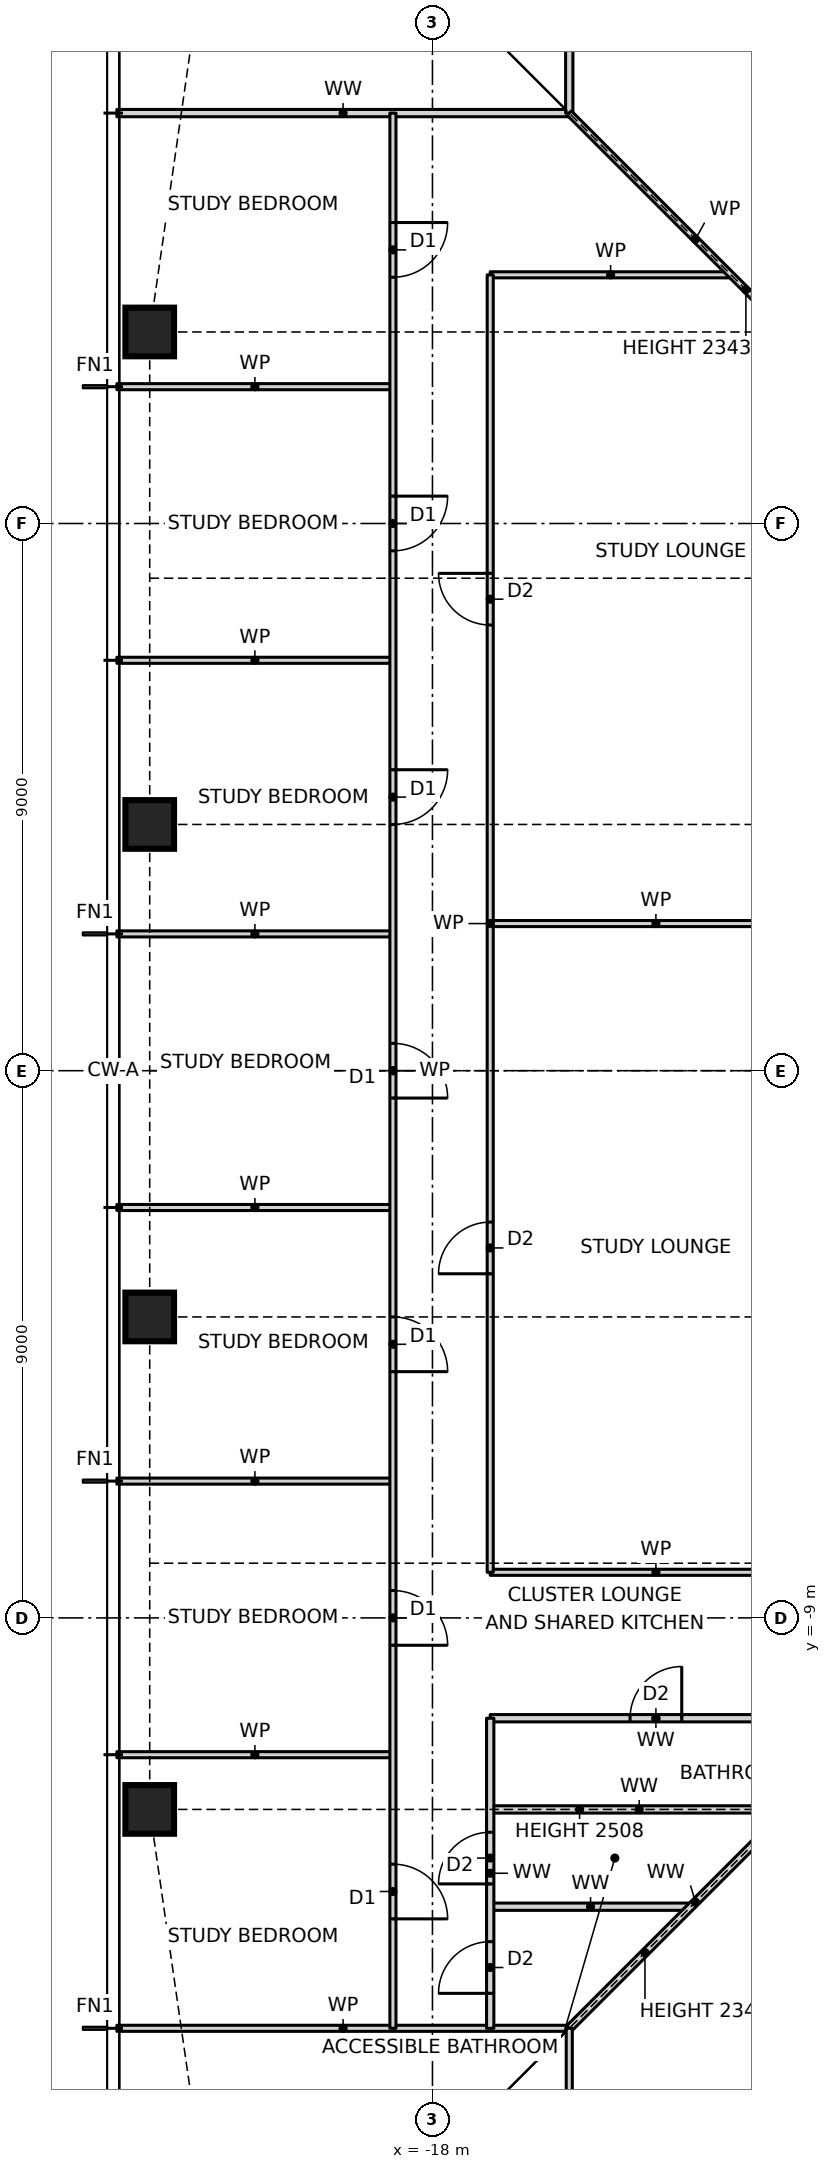
"""IFC4 building model, lengths in metres.
Left out: names, types, materials, properties, quantities, classifications, styles, units other than length and angle.
Written with IfcOpenShell. Run it as: python <this file> out.ifc"""

import sys

from ifc_helpers import new_model, si_unit, direction, frame, frame_2d, origin, origin_2d, place, context, subcontext, project, spatial, rectangle, hollow_rectangle, extrude, element, fill, save


model = new_model("IFC4")
c1 = context("Model", 3, precision=1e-05, world=origin(), true_north=direction((0.0, 1.0)))
c2 = subcontext(c1, "Body", "Model", "MODEL_VIEW")
j1 = project(units=[si_unit("LENGTHUNIT", "METRE"), si_unit("PLANEANGLEUNIT", "RADIAN")], contexts=[c1])
p1 = place(None, origin())
s1 = spatial("IfcSite", under=j1, at=p1, CompositionType="ELEMENT")
p2 = place(p1, origin())
s2 = spatial("IfcBuilding", under=s1, at=p2, CompositionType="ELEMENT")
p3 = place(p2, frame((0.0, 0.0, 25.5)))
s3 = spatial("IfcBuildingStorey", under=s2, at=p3, CompositionType="ELEMENT", Elevation=25.5)
for number, where, z_axis, x_axis in (
    (1, (-22.65, 12.15, 0.0), (0.0, 0.0, 1.0), (1.0, 0.0, 0.0)),
    (2, (-22.65, 4.05, 0.0), (0.0, 0.0, 1.0), (1.0, 0.0, 0.0)),
    (3, (-22.65, -4.05, 0.0), (0.0, 0.0, 1.0), (1.0, 0.0, 0.0)),
    (4, (-22.65, -12.15, 0.0), (0.0, 0.0, 1.0), (1.0, 0.0, 0.0)),
):
    element("IfcColumn", number, at=place(p3, frame(where, z_axis=z_axis, x_axis=x_axis)), inside=s3, PredefinedType="COLUMN", context=c2, shape_type="SweptSolid", body=[
        extrude(hollow_rectangle(XDim=0.8, YDim=0.8, WallThickness=0.09, at=origin_2d()), origin(), (0.0, 0.0, 1.0), 3.5),
    ])
p4 = place(p3, frame((-23.19, -15.75, 0.0), z_axis=(0.0, 0.0, 1.0), x_axis=(1.0, 0.0, 0.0)))
e5 = element("IfcWall", 5, at=p4, inside=s3, PredefinedType="PARTITIONING", context=c2, shape_type="SweptSolid", body=[
    extrude(rectangle(XDim=7.44, YDim=0.1, at=frame_2d((3.72, 0.0))), origin(), (0.0, 0.0, 1.0), 3.27),
])
p5 = place(p3, frame((-17.05, -13.75, 0.0), z_axis=(0.0, 0.0, 1.0), x_axis=(1.0, 0.0, 0.0)))
e6 = element("IfcWall", 6, at=p5, inside=s3, PredefinedType="PARTITIONING", context=c2, shape_type="SweptSolid", body=[
    extrude(rectangle(XDim=3.3, YDim=0.12, at=frame_2d((1.65, 0.0))), origin(), (0.0, 0.0, 1.0), 3.27),
])
p6 = place(p3, frame((-17.05, -12.15, 0.0), z_axis=(0.0, 0.0, 1.0), x_axis=(1.0, 0.0, 0.0)))
e7 = element("IfcWall", 7, at=p6, inside=s3, PredefinedType="PARTITIONING", context=c2, shape_type="SweptSolid", body=[
    extrude(rectangle(XDim=4.9, YDim=0.12, at=frame_2d((2.45, 0.0))), origin(), (0.0, 0.0, 1.0), 2.508),
])
p7 = place(p3, frame((-23.19, -11.25, 0.0), z_axis=(0.0, 0.0, 1.0), x_axis=(1.0, 0.0, 0.0)))
e8 = element("IfcWall", 8, at=p7, inside=s3, PredefinedType="PARTITIONING", context=c2, shape_type="SweptSolid", body=[
    extrude(rectangle(XDim=4.54, YDim=0.1, at=frame_2d((2.27, 0.0))), origin(), (0.0, 0.0, 1.0), 3.27),
])
p8 = place(p3, frame((-17.05, -10.65, 0.0), z_axis=(0.0, 0.0, 1.0), x_axis=(1.0, 0.0, 0.0)))
e9 = element("IfcWall", 9, at=p8, inside=s3, PredefinedType="PARTITIONING", context=c2, shape_type="SweptSolid", body=[
    extrude(rectangle(XDim=5.45, YDim=0.12, at=frame_2d((2.725, 0.0))), origin(), (0.0, 0.0, 1.0), 3.27),
])
p9 = place(p8, frame((2.3, 0.0, 0.0)))
e10 = element("IfcOpeningElement", 10, at=p9, cuts=e9, PredefinedType="OPENING", context=c2, shape_type="SweptSolid", body=[
    extrude(rectangle(XDim=0.85, YDim=2.1, at=frame_2d((0.425, 1.05))), frame((0.0, 0.07, 0.0), z_axis=(0.0, -1.0, 0.0), x_axis=(1.0, 0.0, 0.0)), (0.0, 0.0, 1.0), 0.14),
])
p10 = place(p3, frame((-17.05, -8.25, 0.0), z_axis=(0.0, 0.0, 1.0), x_axis=(1.0, 0.0, 0.0)))
e11 = element("IfcWall", 11, at=p10, inside=s3, PredefinedType="PARTITIONING", context=c2, shape_type="SweptSolid", body=[
    extrude(rectangle(XDim=5.45, YDim=0.1, at=frame_2d((2.725, 0.0))), origin(), (0.0, 0.0, 1.0), 3.27),
])
for number, where, z_axis, x_axis in (
    (12, (-23.19, -6.75, 0.0), (0.0, 0.0, 1.0), (1.0, 0.0, 0.0)),
    (13, (-23.19, -2.25, 0.0), (0.0, 0.0, 1.0), (1.0, 0.0, 0.0)),
    (14, (-23.19, 2.25, 0.0), (0.0, 0.0, 1.0), (1.0, 0.0, 0.0)),
):
    element("IfcWall", number, at=place(p3, frame(where, z_axis=z_axis, x_axis=x_axis)), inside=s3, PredefinedType="PARTITIONING", context=c2, shape_type="SweptSolid", body=[
        extrude(rectangle(XDim=4.54, YDim=0.1, at=frame_2d((2.27, 0.0))), origin(), (0.0, 0.0, 1.0), 3.27),
    ])
p11 = place(p3, frame((-17.05, 2.42, 0.0), z_axis=(0.0, 0.0, 1.0), x_axis=(1.0, 0.0, 0.0)))
e15 = element("IfcWall", 15, at=p11, inside=s3, PredefinedType="PARTITIONING", context=c2, shape_type="SweptSolid", body=[
    extrude(rectangle(XDim=5.45, YDim=0.1, at=frame_2d((2.725, 0.0))), origin(), (0.0, 0.0, 1.0), 3.27),
])
for number, where, z_axis, x_axis in (
    (16, (-23.19, 6.75, 0.0), (0.0, 0.0, 1.0), (1.0, 0.0, 0.0)),
    (17, (-23.19, 11.25, 0.0), (0.0, 0.0, 1.0), (1.0, 0.0, 0.0)),
):
    element("IfcWall", number, at=place(p3, frame(where, z_axis=z_axis, x_axis=x_axis)), inside=s3, PredefinedType="PARTITIONING", context=c2, shape_type="SweptSolid", body=[
        extrude(rectangle(XDim=4.54, YDim=0.1, at=frame_2d((2.27, 0.0))), origin(), (0.0, 0.0, 1.0), 3.27),
    ])
p12 = place(p3, frame((-17.05, 13.09, 0.0), z_axis=(0.0, 0.0, 1.0), x_axis=(1.0, 0.0, 0.0)))
e18 = element("IfcWall", 18, at=p12, inside=s3, PredefinedType="PARTITIONING", context=c2, shape_type="SweptSolid", body=[
    extrude(rectangle(XDim=3.96, YDim=0.1, at=frame_2d((1.98, 0.0))), origin(), (0.0, 0.0, 1.0), 3.27),
])
p13 = place(p3, frame((-23.19, 15.75, 0.0), z_axis=(0.0, 0.0, 1.0), x_axis=(1.0, 0.0, 0.0)))
e19 = element("IfcWall", 19, at=p13, inside=s3, PredefinedType="PARTITIONING", context=c2, shape_type="SweptSolid", body=[
    extrude(rectangle(XDim=7.44, YDim=0.12, at=frame_2d((3.72, 0.0))), origin(), (0.0, 0.0, 1.0), 3.27),
])
p14 = place(p3, frame((-15.75, -15.75, 0.0), z_axis=(0.0, 0.0, 1.0), x_axis=(0.707106781187, 0.707106781187, 0.0)))
e20 = element("IfcWall", 20, at=p14, inside=s3, PredefinedType="PARTITIONING", context=c2, shape_type="SweptSolid", body=[
    extrude(rectangle(XDim=5.869, YDim=0.12, at=frame_2d((2.935, 0.0))), origin(), (0.0, 0.0, 1.0), 2.343),
])
p15 = place(p3, frame((-15.75, -23.19, 0.0), z_axis=(0.0, 0.0, 1.0), x_axis=(0.0, 1.0, 0.0)))
e21 = element("IfcWall", 21, at=p15, inside=s3, PredefinedType="PARTITIONING", context=c2, shape_type="SweptSolid", body=[
    extrude(rectangle(XDim=7.44, YDim=0.1, at=frame_2d((3.72, 0.0))), origin(), (0.0, 0.0, 1.0), 3.27),
])
p16 = place(p15, frame((4.915, 0.0, 0.0)))
e22 = element("IfcOpeningElement", 22, at=p16, cuts=e21, PredefinedType="OPENING", context=c2, shape_type="SweptSolid", body=[
    extrude(rectangle(XDim=0.85, YDim=2.1, at=frame_2d((0.425, 1.05))), frame((0.0, 0.06, 0.0), z_axis=(0.0, -1.0, 0.0), x_axis=(1.0, 0.0, 0.0)), (0.0, 0.0, 1.0), 0.12),
])
p17 = place(p3, frame((-15.75, 15.75, 0.0), z_axis=(0.0, 0.0, 1.0), x_axis=(0.0, 1.0, 0.0)))
e23 = element("IfcWall", 23, at=p17, inside=s3, PredefinedType="PARTITIONING", context=c2, shape_type="SweptSolid", body=[
    extrude(rectangle(XDim=7.44, YDim=0.12, at=frame_2d((3.72, 0.0))), origin(), (0.0, 0.0, 1.0), 3.27),
])
p18 = place(p17, frame((1.675, 0.0, 0.0)))
e24 = element("IfcOpeningElement", 24, at=p18, cuts=e23, PredefinedType="OPENING", context=c2, shape_type="SweptSolid", body=[
    extrude(rectangle(XDim=0.85, YDim=2.1, at=frame_2d((0.425, 1.05))), frame((0.0, 0.07, 0.0), z_axis=(0.0, -1.0, 0.0), x_axis=(1.0, 0.0, 0.0)), (0.0, 0.0, 1.0), 0.14),
])
p19 = place(p3, frame((-17.05, -15.75, 0.0), z_axis=(0.0, 0.0, 1.0), x_axis=(0.0, 1.0, 0.0)))
e25 = element("IfcWall", 25, at=p19, inside=s3, PredefinedType="PARTITIONING", context=c2, shape_type="SweptSolid", body=[
    extrude(rectangle(XDim=5.1, YDim=0.12, at=frame_2d((2.55, 0.0))), origin(), (0.0, 0.0, 1.0), 3.27),
])
p20 = place(p19, frame((2.375, 0.0, 0.0)))
e26 = element("IfcOpeningElement", 26, at=p20, cuts=e25, PredefinedType="OPENING", context=c2, shape_type="SweptSolid", body=[
    extrude(rectangle(XDim=0.85, YDim=2.1, at=frame_2d((0.425, 1.05))), frame((0.0, 0.07, 0.0), z_axis=(0.0, -1.0, 0.0), x_axis=(1.0, 0.0, 0.0)), (0.0, 0.0, 1.0), 0.14),
])
p21 = place(p19, frame((0.575, 0.0, 0.0)))
e27 = element("IfcOpeningElement", 27, at=p21, cuts=e25, PredefinedType="OPENING", context=c2, shape_type="SweptSolid", body=[
    extrude(rectangle(XDim=0.85, YDim=2.1, at=frame_2d((0.425, 1.05))), frame((0.0, 0.07, 0.0), z_axis=(0.0, -1.0, 0.0), x_axis=(1.0, 0.0, 0.0)), (0.0, 0.0, 1.0), 0.14),
])
p22 = place(p3, frame((-17.05, -8.25, 0.0), z_axis=(0.0, 0.0, 1.0), x_axis=(0.0, 1.0, 0.0)))
e28 = element("IfcWall", 28, at=p22, inside=s3, PredefinedType="PARTITIONING", context=c2, shape_type="SweptSolid", body=[
    extrude(rectangle(XDim=21.34, YDim=0.1, at=frame_2d((10.67, 0.0))), origin(), (0.0, 0.0, 1.0), 3.27),
])
p23 = place(p22, frame((15.58, 0.0, 0.0)))
e29 = element("IfcOpeningElement", 29, at=p23, cuts=e28, PredefinedType="OPENING", context=c2, shape_type="SweptSolid", body=[
    extrude(rectangle(XDim=0.85, YDim=2.1, at=frame_2d((0.425, 1.05))), frame((0.0, 0.06, 0.0), z_axis=(0.0, -1.0, 0.0), x_axis=(1.0, 0.0, 0.0)), (0.0, 0.0, 1.0), 0.12),
])
p24 = place(p22, frame((4.91, 0.0, 0.0)))
e30 = element("IfcOpeningElement", 30, at=p24, cuts=e28, PredefinedType="OPENING", context=c2, shape_type="SweptSolid", body=[
    extrude(rectangle(XDim=0.85, YDim=2.1, at=frame_2d((0.425, 1.05))), frame((0.0, 0.06, 0.0), z_axis=(0.0, -1.0, 0.0), x_axis=(1.0, 0.0, 0.0)), (0.0, 0.0, 1.0), 0.12),
])
p25 = place(p3, frame((-18.65, -15.75, 0.0), z_axis=(0.0, 0.0, 1.0), x_axis=(0.0, 1.0, 0.0)))
e31 = element("IfcWall", 31, at=p25, inside=s3, PredefinedType="PARTITIONING", context=c2, shape_type="SweptSolid", body=[
    extrude(rectangle(XDim=31.5, YDim=0.1, at=frame_2d((15.75, 0.0))), origin(), (0.0, 0.0, 1.0), 3.27),
])
p26 = place(p25, frame((28.8, 0.0, 0.0)))
e32 = element("IfcOpeningElement", 32, at=p26, cuts=e31, PredefinedType="OPENING", context=c2, shape_type="SweptSolid", body=[
    extrude(rectangle(XDim=0.9, YDim=2.1, at=frame_2d((0.45, 1.05))), frame((0.0, 0.06, 0.0), z_axis=(0.0, -1.0, 0.0), x_axis=(1.0, 0.0, 0.0)), (0.0, 0.0, 1.0), 0.12),
])
p27 = place(p25, frame((24.3, 0.0, 0.0)))
e33 = element("IfcOpeningElement", 33, at=p27, cuts=e31, PredefinedType="OPENING", context=c2, shape_type="SweptSolid", body=[
    extrude(rectangle(XDim=0.9, YDim=2.1, at=frame_2d((0.45, 1.05))), frame((0.0, 0.06, 0.0), z_axis=(0.0, -1.0, 0.0), x_axis=(1.0, 0.0, 0.0)), (0.0, 0.0, 1.0), 0.12),
])
p28 = place(p25, frame((19.8, 0.0, 0.0)))
e34 = element("IfcOpeningElement", 34, at=p28, cuts=e31, PredefinedType="OPENING", context=c2, shape_type="SweptSolid", body=[
    extrude(rectangle(XDim=0.9, YDim=2.1, at=frame_2d((0.45, 1.05))), frame((0.0, 0.06, 0.0), z_axis=(0.0, -1.0, 0.0), x_axis=(1.0, 0.0, 0.0)), (0.0, 0.0, 1.0), 0.12),
])
p29 = place(p25, frame((15.3, 0.0, 0.0)))
e35 = element("IfcOpeningElement", 35, at=p29, cuts=e31, PredefinedType="OPENING", context=c2, shape_type="SweptSolid", body=[
    extrude(rectangle(XDim=0.9, YDim=2.1, at=frame_2d((0.45, 1.05))), frame((0.0, 0.06, 0.0), z_axis=(0.0, -1.0, 0.0), x_axis=(1.0, 0.0, 0.0)), (0.0, 0.0, 1.0), 0.12),
])
p30 = place(p25, frame((10.8, 0.0, 0.0)))
e36 = element("IfcOpeningElement", 36, at=p30, cuts=e31, PredefinedType="OPENING", context=c2, shape_type="SweptSolid", body=[
    extrude(rectangle(XDim=0.9, YDim=2.1, at=frame_2d((0.45, 1.05))), frame((0.0, 0.06, 0.0), z_axis=(0.0, -1.0, 0.0), x_axis=(1.0, 0.0, 0.0)), (0.0, 0.0, 1.0), 0.12),
])
p31 = place(p25, frame((6.3, 0.0, 0.0)))
e37 = element("IfcOpeningElement", 37, at=p31, cuts=e31, PredefinedType="OPENING", context=c2, shape_type="SweptSolid", body=[
    extrude(rectangle(XDim=0.9, YDim=2.1, at=frame_2d((0.45, 1.05))), frame((0.0, 0.06, 0.0), z_axis=(0.0, -1.0, 0.0), x_axis=(1.0, 0.0, 0.0)), (0.0, 0.0, 1.0), 0.12),
])
p32 = place(p25, frame((1.8, 0.0, 0.0)))
e38 = element("IfcOpeningElement", 38, at=p32, cuts=e31, PredefinedType="OPENING", context=c2, shape_type="SweptSolid", body=[
    extrude(rectangle(XDim=0.9, YDim=2.1, at=frame_2d((0.45, 1.05))), frame((0.0, 0.06, 0.0), z_axis=(0.0, -1.0, 0.0), x_axis=(1.0, 0.0, 0.0)), (0.0, 0.0, 1.0), 0.12),
])
p33 = place(p3, frame((-11.6, 11.6, 0.0), z_axis=(0.0, 0.0, 1.0), x_axis=(-0.707106781187, 0.707106781187, 0.0)))
e39 = element("IfcWall", 39, at=p33, inside=s3, PredefinedType="PARTITIONING", context=c2, shape_type="SweptSolid", body=[
    extrude(rectangle(XDim=5.869, YDim=0.1, at=frame_2d((2.935, 0.0))), origin(), (0.0, 0.0, 1.0), 2.343),
])
p34 = place(p26, frame((0.9, 0.0, 0.0), z_axis=(0.0, 0.0, 1.0), x_axis=(-1.0, 0.0, 0.0)))
e40 = element("IfcDoor", 40, at=p34, inside=s3, OperationType="SINGLE_SWING_LEFT", PredefinedType="DOOR", context=c2, shape_type="SweptSolid", body=[
    extrude(rectangle(XDim=0.9, YDim=2.1, at=frame_2d((0.45, 1.05))), frame((0.0, 0.025, 0.0), z_axis=(0.0, -1.0, 0.0), x_axis=(1.0, 0.0, 0.0)), (0.0, 0.0, 1.0), 0.05),
])
fill(e32, e40)
p35 = place(p27, frame((0.9, 0.0, 0.0), z_axis=(0.0, 0.0, 1.0), x_axis=(-1.0, 0.0, 0.0)))
e41 = element("IfcDoor", 41, at=p35, inside=s3, OperationType="SINGLE_SWING_LEFT", PredefinedType="DOOR", context=c2, shape_type="SweptSolid", body=[
    extrude(rectangle(XDim=0.9, YDim=2.1, at=frame_2d((0.45, 1.05))), frame((0.0, 0.025, 0.0), z_axis=(0.0, -1.0, 0.0), x_axis=(1.0, 0.0, 0.0)), (0.0, 0.0, 1.0), 0.05),
])
fill(e33, e41)
p36 = place(p28, frame((0.9, 0.0, 0.0), z_axis=(0.0, 0.0, 1.0), x_axis=(-1.0, 0.0, 0.0)))
e42 = element("IfcDoor", 42, at=p36, inside=s3, OperationType="SINGLE_SWING_LEFT", PredefinedType="DOOR", context=c2, shape_type="SweptSolid", body=[
    extrude(rectangle(XDim=0.9, YDim=2.1, at=frame_2d((0.45, 1.05))), frame((0.0, 0.025, 0.0), z_axis=(0.0, -1.0, 0.0), x_axis=(1.0, 0.0, 0.0)), (0.0, 0.0, 1.0), 0.05),
])
fill(e34, e42)
p37 = place(p29, frame((0.9, 0.0, 0.0), z_axis=(0.0, 0.0, 1.0), x_axis=(-1.0, 0.0, 0.0)))
e43 = element("IfcDoor", 43, at=p37, inside=s3, OperationType="SINGLE_SWING_RIGHT", PredefinedType="DOOR", context=c2, shape_type="SweptSolid", body=[
    extrude(rectangle(XDim=0.9, YDim=2.1, at=frame_2d((0.45, 1.05))), frame((0.0, 0.025, 0.0), z_axis=(0.0, -1.0, 0.0), x_axis=(1.0, 0.0, 0.0)), (0.0, 0.0, 1.0), 0.05),
])
fill(e35, e43)
p38 = place(p30, frame((0.9, 0.0, 0.0), z_axis=(0.0, 0.0, 1.0), x_axis=(-1.0, 0.0, 0.0)))
e44 = element("IfcDoor", 44, at=p38, inside=s3, OperationType="SINGLE_SWING_RIGHT", PredefinedType="DOOR", context=c2, shape_type="SweptSolid", body=[
    extrude(rectangle(XDim=0.9, YDim=2.1, at=frame_2d((0.45, 1.05))), frame((0.0, 0.025, 0.0), z_axis=(0.0, -1.0, 0.0), x_axis=(1.0, 0.0, 0.0)), (0.0, 0.0, 1.0), 0.05),
])
fill(e36, e44)
p39 = place(p31, frame((0.9, 0.0, 0.0), z_axis=(0.0, 0.0, 1.0), x_axis=(-1.0, 0.0, 0.0)))
e45 = element("IfcDoor", 45, at=p39, inside=s3, OperationType="SINGLE_SWING_RIGHT", PredefinedType="DOOR", context=c2, shape_type="SweptSolid", body=[
    extrude(rectangle(XDim=0.9, YDim=2.1, at=frame_2d((0.45, 1.05))), frame((0.0, 0.025, 0.0), z_axis=(0.0, -1.0, 0.0), x_axis=(1.0, 0.0, 0.0)), (0.0, 0.0, 1.0), 0.05),
])
fill(e37, e45)
p40 = place(p32, frame((0.9, 0.0, 0.0), z_axis=(0.0, 0.0, 1.0), x_axis=(-1.0, 0.0, 0.0)))
e46 = element("IfcDoor", 46, at=p40, inside=s3, OperationType="SINGLE_SWING_RIGHT", PredefinedType="DOOR", context=c2, shape_type="SweptSolid", body=[
    extrude(rectangle(XDim=0.9, YDim=2.1, at=frame_2d((0.45, 1.05))), frame((0.0, 0.025, 0.0), z_axis=(0.0, -1.0, 0.0), x_axis=(1.0, 0.0, 0.0)), (0.0, 0.0, 1.0), 0.05),
])
fill(e38, e46)
p41 = place(p23, origin())
e47 = element("IfcDoor", 47, at=p41, inside=s3, OperationType="SINGLE_SWING_RIGHT", PredefinedType="DOOR", context=c2, shape_type="SweptSolid", body=[
    extrude(rectangle(XDim=0.85, YDim=2.1, at=frame_2d((0.425, 1.05))), frame((0.0, 0.025, 0.0), z_axis=(0.0, -1.0, 0.0), x_axis=(1.0, 0.0, 0.0)), (0.0, 0.0, 1.0), 0.05),
])
fill(e29, e47)
p42 = place(p24, origin())
e48 = element("IfcDoor", 48, at=p42, inside=s3, OperationType="SINGLE_SWING_LEFT", PredefinedType="DOOR", context=c2, shape_type="SweptSolid", body=[
    extrude(rectangle(XDim=0.85, YDim=2.1, at=frame_2d((0.425, 1.05))), frame((0.0, 0.025, 0.0), z_axis=(0.0, -1.0, 0.0), x_axis=(1.0, 0.0, 0.0)), (0.0, 0.0, 1.0), 0.05),
])
fill(e30, e48)
p43 = place(p9, origin())
e49 = element("IfcDoor", 49, at=p43, inside=s3, OperationType="SINGLE_SWING_RIGHT", PredefinedType="DOOR", context=c2, shape_type="SweptSolid", body=[
    extrude(rectangle(XDim=0.85, YDim=2.1, at=frame_2d((0.425, 1.05))), frame((0.0, 0.025, 0.0), z_axis=(0.0, -1.0, 0.0), x_axis=(1.0, 0.0, 0.0)), (0.0, 0.0, 1.0), 0.05),
])
fill(e10, e49)
p44 = place(p20, origin())
e50 = element("IfcDoor", 50, at=p44, inside=s3, OperationType="SINGLE_SWING_LEFT", PredefinedType="DOOR", context=c2, shape_type="SweptSolid", body=[
    extrude(rectangle(XDim=0.85, YDim=2.1, at=frame_2d((0.425, 1.05))), frame((0.0, 0.025, 0.0), z_axis=(0.0, -1.0, 0.0), x_axis=(1.0, 0.0, 0.0)), (0.0, 0.0, 1.0), 0.05),
])
fill(e26, e50)
p45 = place(p21, origin())
e51 = element("IfcDoor", 51, at=p45, inside=s3, OperationType="SINGLE_SWING_LEFT", PredefinedType="DOOR", context=c2, shape_type="SweptSolid", body=[
    extrude(rectangle(XDim=0.85, YDim=2.1, at=frame_2d((0.425, 1.05))), frame((0.0, 0.025, 0.0), z_axis=(0.0, -1.0, 0.0), x_axis=(1.0, 0.0, 0.0)), (0.0, 0.0, 1.0), 0.05),
])
fill(e27, e51)
save(model, sys.argv[1])
